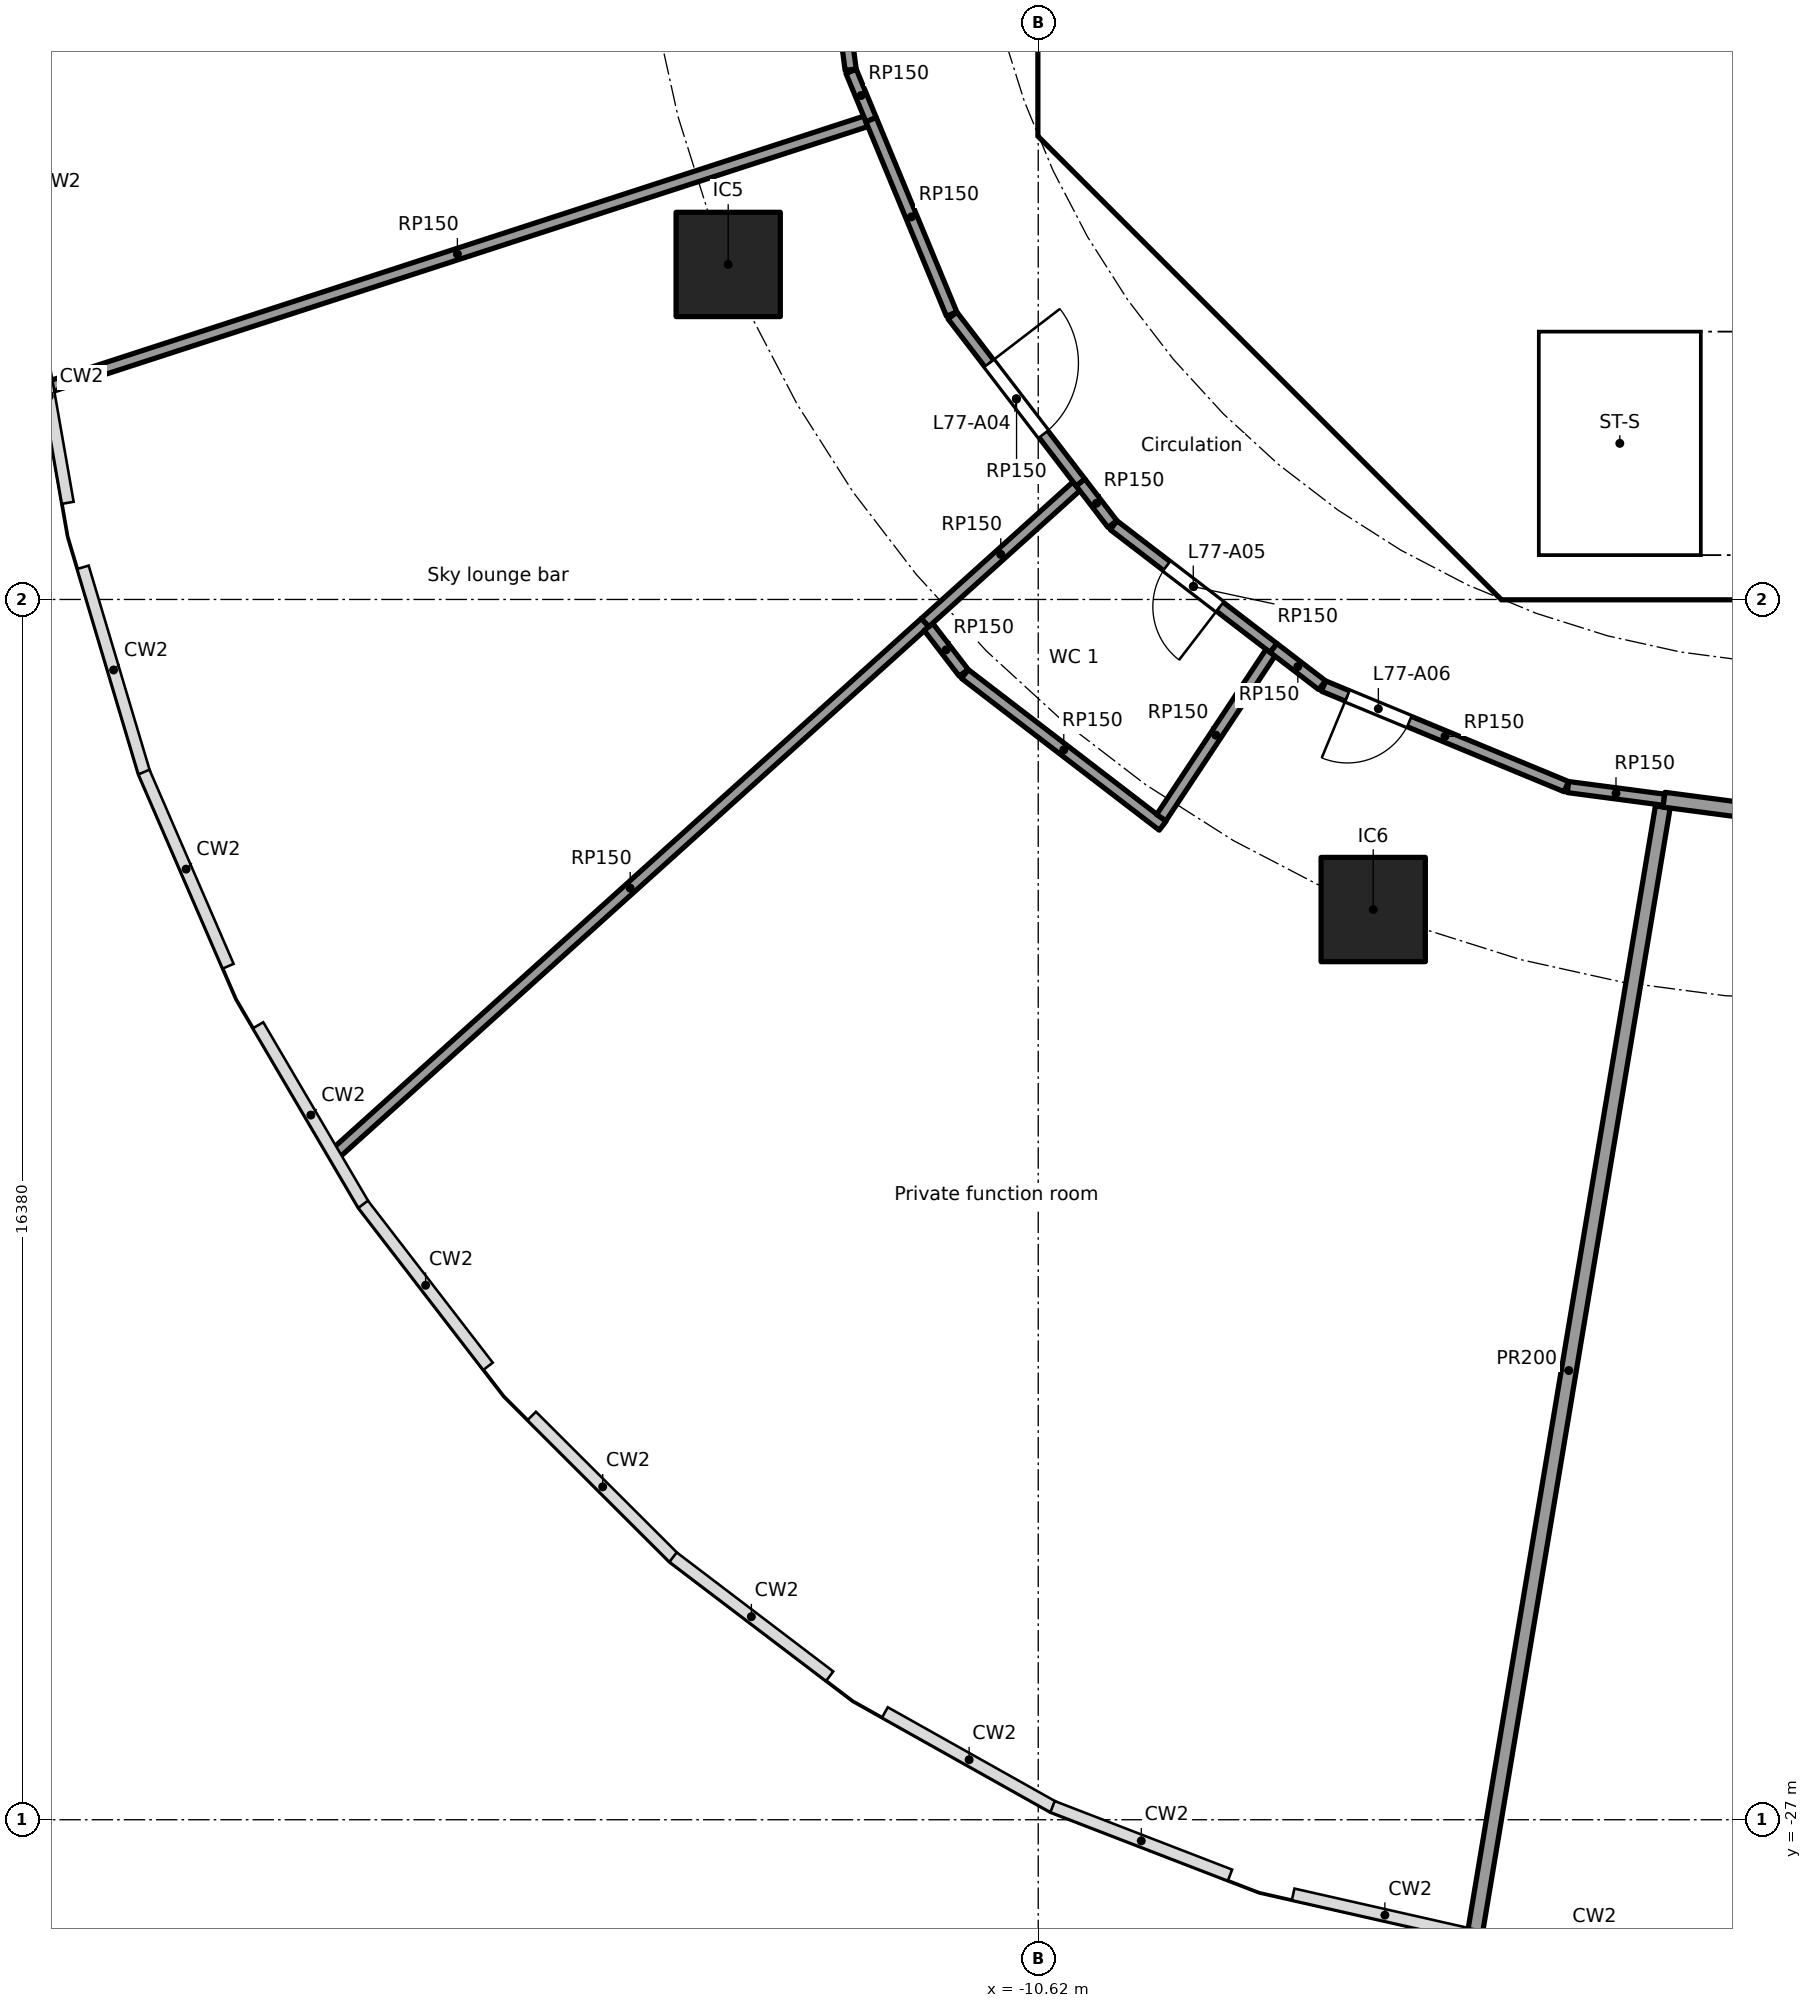
"""IFC4 building model, lengths in metres.
Left out: names, types, materials, properties, quantities, classifications, styles, units other than length and angle.
Written with IfcOpenShell. Run it as: python <this file> out.ifc"""

import sys

from ifc_helpers import new_model, si_unit, direction, frame, frame_2d, origin, origin_2d, place, context, subcontext, project, spatial, polyline, rectangle, outline, extrude, element, fill, save


model = new_model("IFC4")
c1 = context("Model", 3, precision=1e-05, world=origin(), true_north=direction((0.0, 1.0)))
c2 = subcontext(c1, "Body", "Model", "MODEL_VIEW")
j1 = project(units=[si_unit("LENGTHUNIT", "METRE"), si_unit("PLANEANGLEUNIT", "RADIAN")], contexts=[c1])
p1 = place(None, origin())
s1 = spatial("IfcSite", under=j1, at=p1, CompositionType="ELEMENT")
p2 = place(p1, origin())
s2 = spatial("IfcBuilding", under=s1, at=p2, CompositionType="ELEMENT")
p3 = place(p2, frame((0.0, 0.0, 310.3)))
s3 = spatial("IfcBuildingStorey", under=s2, at=p3, CompositionType="ELEMENT", Elevation=310.3)
for number, where, z_axis, x_axis in (
    (1, (-14.782, -6.123, 0.0), (0.0, 0.0, 1.0), (1.0, 0.0, 0.0)),
    (2, (-6.123, -14.782, 0.0), (0.0, 0.0, 1.0), (1.0, 0.0, 0.0)),
):
    element("IfcColumn", number, at=place(p3, frame(where, z_axis=z_axis, x_axis=x_axis)), inside=s3, PredefinedType="COLUMN", context=c2, shape_type="SweptSolid", body=[
        extrude(rectangle(XDim=1.4, YDim=1.4, at=origin_2d()), origin(), (0.0, 0.0, 1.0), 5.6),
    ])
p4 = place(p3, frame((-10.325, 3.801, 0.0), z_axis=(0.0, 0.0, 1.0), x_axis=(0.0, -1.0, 0.0)))
e3 = element("IfcWall", 3, at=p4, inside=s3, PredefinedType="SHEAR", context=c2, shape_type="SweptSolid", body=[
    extrude(rectangle(XDim=7.602, YDim=0.6, at=frame_2d((3.801, 0.0))), origin(), (0.0, 0.0, 1.0), 5.3),
])
p5 = place(p4, frame((0.651, 0.0, 0.0)))
e4 = element("IfcOpeningElement", 4, at=p5, cuts=e3, PredefinedType="OPENING", context=c2, shape_type="SweptSolid", body=[
    extrude(rectangle(XDim=1.5, YDim=2.1, at=frame_2d((0.75, 1.05))), frame((0.0, 0.31, 0.0), z_axis=(0.0, -1.0, 0.0), x_axis=(1.0, 0.0, 0.0)), (0.0, 0.0, 1.0), 0.62),
])
p6 = place(p4, frame((5.451, 0.0, 0.0)))
e5 = element("IfcOpeningElement", 5, at=p6, cuts=e3, PredefinedType="OPENING", context=c2, shape_type="SweptSolid", body=[
    extrude(rectangle(XDim=1.5, YDim=2.1, at=frame_2d((0.75, 1.05))), frame((0.0, 0.31, 0.0), z_axis=(0.0, -1.0, 0.0), x_axis=(1.0, 0.0, 0.0)), (0.0, 0.0, 1.0), 0.62),
])
p7 = place(p3, frame((-9.988, -4.613, 0.0), z_axis=(0.0, 0.0, 1.0), x_axis=(0.707106781187, -0.707106781187, 0.0)))
e6 = element("IfcWall", 6, at=p7, inside=s3, PredefinedType="SHEAR", context=c2, shape_type="SweptSolid", body=[
    extrude(rectangle(XDim=7.602, YDim=0.6, at=frame_2d((3.801, 0.0))), origin(), (0.0, 0.0, 1.0), 5.3),
])
p8 = place(p7, frame((6.151, 0.0, 0.0)))
e7 = element("IfcOpeningElement", 7, at=p8, cuts=e6, PredefinedType="OPENING", context=c2, shape_type="SweptSolid", body=[
    extrude(rectangle(XDim=1.1, YDim=2.1, at=frame_2d((0.55, 1.05))), frame((0.0, 0.31, 0.0), z_axis=(0.0, -1.0, 0.0), x_axis=(1.0, 0.0, 0.0)), (0.0, 0.0, 1.0), 0.62),
])
p9 = place(p3, frame((-7.0, -7.027, 0.0), z_axis=(0.0, 0.0, 1.0), x_axis=(0.0, 1.0, 0.0)))
e8 = element("IfcWall", 8, at=p9, inside=s3, PredefinedType="PARTITIONING", context=c2, shape_type="SweptSolid", body=[
    extrude(rectangle(XDim=2.927, YDim=0.15, at=frame_2d((1.463, 0.0))), origin(), (0.0, 0.0, 1.0), 5.3),
])
p10 = place(p9, frame((0.976, 0.0, 0.0)))
e9 = element("IfcOpeningElement", 9, at=p10, cuts=e8, PredefinedType="OPENING", context=c2, shape_type="SweptSolid", body=[
    extrude(rectangle(XDim=0.9, YDim=2.1, at=frame_2d((0.45, 1.05))), frame((0.0, 0.085, 0.0), z_axis=(0.0, -1.0, 0.0), x_axis=(1.0, 0.0, 0.0)), (0.0, 0.0, 1.0), 0.17),
])
p11 = place(p3, frame((-4.0, -6.5, 0.0), z_axis=(0.0, 0.0, 1.0), x_axis=(0.0, 1.0, 0.0)))
e10 = element("IfcWall", 10, at=p11, inside=s3, PredefinedType="SOLIDWALL", context=c2, shape_type="SweptSolid", body=[
    extrude(rectangle(XDim=2.2, YDim=0.2, at=frame_2d((1.1, 0.0))), origin(), (0.0, 0.0, 1.0), 5.3),
])
p12 = place(p11, frame((0.65, 0.0, 0.0)))
e11 = element("IfcOpeningElement", 11, at=p12, cuts=e10, PredefinedType="OPENING", context=c2, shape_type="SweptSolid", body=[
    extrude(rectangle(XDim=0.9, YDim=2.1, at=frame_2d((0.45, 1.05))), frame((0.0, 0.11, 0.0), z_axis=(0.0, -1.0, 0.0), x_axis=(1.0, 0.0, 0.0)), (0.0, 0.0, 1.0), 0.22),
])
p13 = place(p3, origin())
e12 = element("IfcWall", 12, at=p13, inside=s3, PredefinedType="SHEAR", context=c2, shape_type="SweptSolid", body=[
    extrude(outline(polyline([(-10.625, -3.801), (-10.025, -3.801), (-10.025, -4.152), (-9.776, -4.401), (-10.2, -4.825), (-10.625, -4.401), (-10.625, -3.801)])), origin(), (0.0, 0.0, 1.0), 5.3),
])
p14 = place(p3, origin())
e13 = element("IfcWall", 13, at=p14, inside=s3, PredefinedType="SHEAR", context=c2, shape_type="SweptSolid", body=[
    extrude(outline(polyline([(-4.152, -10.025), (4.152, -10.025), (4.401, -9.776), (4.825, -10.2), (4.401, -10.625), (-4.401, -10.625), (-4.825, -10.2), (-4.401, -9.776), (-4.152, -10.025)])), origin(), (0.0, 0.0, 1.0), 5.3),
])
p15 = place(p3, origin())
e14 = element("IfcWall", 14, at=p15, inside=s3, PredefinedType="SOLIDWALL", context=c2, shape_type="SweptSolid", body=[
    extrude(outline(polyline([(-6.7, -2.1), (-6.5, -2.1), (-6.5, -4.1), (-2.3, -4.1), (-2.3, -2.1), (-2.1, -2.1), (-2.1, -4.1), (2.1, -4.1), (2.1, -2.1), (2.3, -2.1), (2.3, -4.1), (4.3, -4.1), (4.3, -2.1), (4.5, -2.1), (4.5, -4.1), (6.5, -4.1), (6.5, -2.1), (6.7, -2.1), (6.7, -4.3), (-6.7, -4.3), (-6.7, -2.1)])), origin(), (0.0, 0.0, 1.0), 5.3),
])
p16 = place(p3, frame((-10.025, -4.0, 0.0), z_axis=(0.0, 0.0, 1.0), x_axis=(1.0, 0.0, 0.0)))
e15 = element("IfcWall", 15, at=p16, inside=s3, PredefinedType="PARTITIONING", context=c2, shape_type="SweptSolid", body=[
    extrude(rectangle(XDim=3.325, YDim=0.2, at=frame_2d((1.662, 0.0))), origin(), (0.0, 0.0, 1.0), 5.3),
])
p17 = place(p3, origin())
e16 = element("IfcWall", 16, at=p17, inside=s3, PredefinedType="SOLIDWALL", context=c2, shape_type="SweptSolid", body=[
    extrude(outline(polyline([(-3.9, -10.025), (-4.1, -10.025), (-4.1, -7.025), (-3.9, -7.025), (-3.9, -10.025)])), origin(), (0.0, 0.0, 1.0), 5.3),
])
p18 = place(p3, origin())
e17 = element("IfcWall", 17, at=p18, inside=s3, PredefinedType="SOLIDWALL", context=c2, shape_type="SweptSolid", body=[
    extrude(outline(polyline([(4.1, -7.025), (-4.1, -7.025), (-4.1, -6.5), (4.1, -6.5), (4.1, -7.025)])), origin(), (0.0, 0.0, 1.0), 5.3),
])
p19 = place(p3, frame((-13.138, -3.508, 0.0), z_axis=(0.0, 0.0, 1.0), x_axis=(-0.130499283623, 0.991448403586, 0.0)))
e18 = element("IfcWall", 18, at=p19, inside=s3, PredefinedType="PARTITIONING", context=c2, shape_type="SweptSolid", body=[
    extrude(rectangle(XDim=3.527, YDim=0.15, at=frame_2d((1.763, 0.0))), origin(), (0.0, 0.0, 1.0), 5.3),
])
p20 = place(p3, frame((-12.935, -4.203, 0.0), z_axis=(0.0, 0.0, 1.0), x_axis=(-0.951055230502, -0.30902095161, 0.0)))
e19 = element("IfcWall", 19, at=p20, inside=s3, PredefinedType="PARTITIONING", context=c2, shape_type="SweptSolid", body=[
    extrude(rectangle(XDim=11.529, YDim=0.15, at=frame_2d((5.765, 0.0))), origin(), (0.0, 0.0, 1.0), 5.3),
])
p21 = place(p3, frame((-12.863, -4.18, 0.0), z_axis=(0.0, 0.0, 1.0), x_axis=(-0.382689470177, 0.923877031545, 0.0)))
e20 = element("IfcWall", 20, at=p21, inside=s3, PredefinedType="PARTITIONING", context=c2, shape_type="SweptSolid", body=[
    extrude(rectangle(XDim=0.702, YDim=0.15, at=frame_2d((0.351, 0.0))), origin(), (0.0, 0.0, 1.0), 5.3),
])
p22 = place(p3, frame((-12.138, -10.93, 0.0), z_axis=(0.0, 0.0, 1.0), x_axis=(-0.743151720373, -0.669122948722, 0.0)))
e21 = element("IfcWall", 21, at=p22, inside=s3, PredefinedType="PARTITIONING", context=c2, shape_type="SweptSolid", body=[
    extrude(rectangle(XDim=10.656, YDim=0.15, at=frame_2d((5.328, 0.0))), origin(), (0.0, 0.0, 1.0), 5.3),
])
p23 = place(p3, frame((-11.782, -6.789, 0.0), z_axis=(0.0, 0.0, 1.0), x_axis=(-0.382674980262, 0.923883033442, 0.0)))
e22 = element("IfcWall", 22, at=p23, inside=s3, PredefinedType="PARTITIONING", context=c2, shape_type="SweptSolid", body=[
    extrude(rectangle(XDim=2.824, YDim=0.15, at=frame_2d((1.412, 0.0))), origin(), (0.0, 0.0, 1.0), 5.3),
])
p24 = place(p3, frame((-11.621, -11.604, 0.0), z_axis=(0.0, 0.0, 1.0), x_axis=(-0.608781909099, 0.793337624945, 0.0)))
e23 = element("IfcWall", 23, at=p24, inside=s3, PredefinedType="PARTITIONING", context=c2, shape_type="SweptSolid", body=[
    extrude(rectangle(XDim=0.775, YDim=0.15, at=frame_2d((0.388, 0.0))), origin(), (0.0, 0.0, 1.0), 5.3),
])
p25 = place(p3, frame((-10.107, -9.101, 0.0), z_axis=(0.0, 0.0, 1.0), x_axis=(-0.743116473198, -0.669162093414, 0.0)))
e24 = element("IfcWall", 24, at=p25, inside=s3, PredefinedType="PARTITIONING", context=c2, shape_type="SweptSolid", body=[
    extrude(rectangle(XDim=2.733, YDim=0.15, at=frame_2d((1.367, 0.0))), origin(), (0.0, 0.0, 1.0), 5.3),
])
p26 = place(p3, frame((-10.051, -9.05, 0.0), z_axis=(0.0, 0.0, 1.0), x_axis=(-0.608745411834, 0.793365630445, 0.0)))
e25 = element("IfcWall", 25, at=p26, inside=s3, PredefinedType="PARTITIONING", context=c2, shape_type="SweptSolid", body=[
    extrude(rectangle(XDim=2.825, YDim=0.15, at=frame_2d((1.412, 0.0))), origin(), (0.0, 0.0, 1.0), 5.3),
])
p27 = place(p26, frame((0.818, 0.0, 0.0)))
e26 = element("IfcOpeningElement", 26, at=p27, cuts=e25, PredefinedType="OPENING", context=c2, shape_type="SweptSolid", body=[
    extrude(rectangle(XDim=1.2, YDim=2.1, at=frame_2d((0.6, 1.05))), frame((0.0, 0.085, 0.0), z_axis=(0.0, -1.0, 0.0), x_axis=(1.0, 0.0, 0.0)), (0.0, 0.0, 1.0), 0.17),
])
p28 = place(p3, frame((-9.624, -9.607, 0.0), z_axis=(0.0, 0.0, 1.0), x_axis=(-0.608701690893, 0.793399175387, 0.0)))
e27 = element("IfcWall", 27, at=p28, inside=s3, PredefinedType="PARTITIONING", context=c2, shape_type="SweptSolid", body=[
    extrude(rectangle(XDim=0.702, YDim=0.15, at=frame_2d((0.351, 0.0))), origin(), (0.0, 0.0, 1.0), 5.3),
])
p29 = place(p3, frame((-8.95, -13.657, 0.0), z_axis=(0.0, 0.0, 1.0), x_axis=(-0.793366697833, 0.608744020725, 0.0)))
e28 = element("IfcWall", 28, at=p29, inside=s3, PredefinedType="PARTITIONING", context=c2, shape_type="SweptSolid", body=[
    extrude(rectangle(XDim=3.346, YDim=0.15, at=frame_2d((1.673, 0.0))), origin(), (0.0, 0.0, 1.0), 5.3),
])
p30 = place(p3, frame((-7.46, -11.271, 0.0), z_axis=(0.0, 0.0, 1.0), x_axis=(-0.793357968255, 0.608755397682, 0.0)))
e29 = element("IfcWall", 29, at=p30, inside=s3, PredefinedType="PARTITIONING", context=c2, shape_type="SweptSolid", body=[
    extrude(rectangle(XDim=2.706, YDim=0.15, at=frame_2d((1.353, 0.0))), origin(), (0.0, 0.0, 1.0), 5.3),
])
p31 = place(p30, frame((0.909, 0.0, 0.0)))
e30 = element("IfcOpeningElement", 30, at=p31, cuts=e29, PredefinedType="OPENING", context=c2, shape_type="SweptSolid", body=[
    extrude(rectangle(XDim=0.9, YDim=2.1, at=frame_2d((0.45, 1.05))), frame((0.0, 0.085, 0.0), z_axis=(0.0, -1.0, 0.0), x_axis=(1.0, 0.0, 0.0)), (0.0, 0.0, 1.0), 0.17),
])
p32 = place(p3, frame((-7.502, -11.334, 0.0), z_axis=(0.0, 0.0, 1.0), x_axis=(-0.55191859821, -0.833897991933, 0.0)))
e31 = element("IfcWall", 31, at=p32, inside=s3, PredefinedType="PARTITIONING", context=c2, shape_type="SweptSolid", body=[
    extrude(rectangle(XDim=2.656, YDim=0.15, at=frame_2d((1.328, 0.0))), origin(), (0.0, 0.0, 1.0), 5.3),
])
p33 = place(p3, frame((-6.809, -11.771, 0.0), z_axis=(0.0, 0.0, 1.0), x_axis=(-0.793419582726, 0.60867509046, 0.0)))
e32 = element("IfcWall", 32, at=p33, inside=s3, PredefinedType="PARTITIONING", context=c2, shape_type="SweptSolid", body=[
    extrude(rectangle(XDim=0.821, YDim=0.15, at=frame_2d((0.41, 0.0))), origin(), (0.0, 0.0, 1.0), 5.3),
])
p34 = place(p3, frame((-3.531, -13.132, 0.0), z_axis=(0.0, 0.0, 1.0), x_axis=(-0.923881838111, 0.382677866108, 0.0)))
e33 = element("IfcWall", 33, at=p34, inside=s3, PredefinedType="PARTITIONING", context=c2, shape_type="SweptSolid", body=[
    extrude(rectangle(XDim=3.527, YDim=0.15, at=frame_2d((1.763, 0.0))), origin(), (0.0, 0.0, 1.0), 5.3),
])
p35 = place(p34, frame((2.281, 0.0, 0.0)))
e34 = element("IfcOpeningElement", 34, at=p35, cuts=e33, PredefinedType="OPENING", context=c2, shape_type="SweptSolid", body=[
    extrude(rectangle(XDim=0.9, YDim=2.1, at=frame_2d((0.45, 1.05))), frame((0.0, 0.085, 0.0), z_axis=(0.0, -1.0, 0.0), x_axis=(1.0, 0.0, 0.0)), (0.0, 0.0, 1.0), 0.17),
])
p36 = place(p3, frame((-2.219, -13.308, 0.0), z_axis=(0.0, 0.0, 1.0), x_axis=(-0.991441503566, 0.130551694767, 0.0)))
e35 = element("IfcWall", 35, at=p36, inside=s3, PredefinedType="PARTITIONING", context=c2, shape_type="SweptSolid", body=[
    extrude(rectangle(XDim=1.3, YDim=0.15, at=frame_2d((0.65, 0.0))), origin(), (0.0, 0.0, 1.0), 5.3),
])
p37 = place(p3, frame((-2.236, -13.406, 0.0), z_axis=(0.0, 0.0, 1.0), x_axis=(-0.164512574318, -0.986374985942, 0.0)))
e36 = element("IfcWall", 36, at=p37, inside=s3, PredefinedType="PARTITIONING", context=c2, shape_type="SweptSolid", body=[
    extrude(rectangle(XDim=15.336, YDim=0.2, at=frame_2d((7.668, 0.0))), origin(), (0.0, 0.0, 1.0), 5.3),
])
p38 = place(p3, frame((-0.015, -13.598, 0.0), z_axis=(0.0, 0.0, 1.0), x_axis=(-0.991454669289, 0.130451672069, 0.0)))
e37 = element("IfcWall", 37, at=p38, inside=s3, PredefinedType="PARTITIONING", context=c2, shape_type="SweptSolid", body=[
    extrude(rectangle(XDim=2.223, YDim=0.2, at=frame_2d((1.112, 0.0))), origin(), (0.0, 0.0, 1.0), 5.3),
])
p39 = place(p10, origin())
e38 = element("IfcDoor", 38, at=p39, inside=s3, OperationType="SINGLE_SWING_RIGHT", PredefinedType="DOOR", context=c2, shape_type="SweptSolid", body=[
    extrude(rectangle(XDim=0.9, YDim=2.1, at=frame_2d((0.45, 1.05))), frame((0.0, 0.025, 0.0), z_axis=(0.0, -1.0, 0.0), x_axis=(1.0, 0.0, 0.0)), (0.0, 0.0, 1.0), 0.05),
])
fill(e9, e38)
p40 = place(p12, frame((0.9, 0.0, 0.0), x_axis=(-1.0, 0.0, 0.0)))
e39 = element("IfcDoor", 39, at=p40, inside=s3, OperationType="SINGLE_SWING_LEFT", PredefinedType="DOOR", context=c2, shape_type="SweptSolid", body=[
    extrude(rectangle(XDim=0.9, YDim=2.1, at=frame_2d((0.45, 1.05))), frame((0.0, 0.025, 0.0), z_axis=(0.0, -1.0, 0.0), x_axis=(1.0, 0.0, 0.0)), (0.0, 0.0, 1.0), 0.05),
])
fill(e11, e39)
p41 = place(p8, origin())
e40 = element("IfcDoor", 40, at=p41, inside=s3, OperationType="SINGLE_SWING_LEFT", PredefinedType="DOOR", context=c2, shape_type="SweptSolid", body=[
    extrude(rectangle(XDim=1.1, YDim=2.1, at=frame_2d((0.55, 1.05))), frame((0.0, 0.025, 0.0), z_axis=(0.0, -1.0, 0.0), x_axis=(1.0, 0.0, 0.0)), (0.0, 0.0, 1.0), 0.05),
])
fill(e7, e40)
p42 = place(p27, frame((1.2, 0.0, 0.0), x_axis=(-1.0, 0.0, 0.0)))
e41 = element("IfcDoor", 41, at=p42, inside=s3, OperationType="SINGLE_SWING_LEFT", PredefinedType="DOOR", context=c2, shape_type="SweptSolid", body=[
    extrude(rectangle(XDim=1.2, YDim=2.1, at=frame_2d((0.6, 1.05))), frame((0.0, 0.025, 0.0), z_axis=(0.0, -1.0, 0.0), x_axis=(1.0, 0.0, 0.0)), (0.0, 0.0, 1.0), 0.05),
])
fill(e26, e41)
p43 = place(p31, origin())
e42 = element("IfcDoor", 42, at=p43, inside=s3, OperationType="SINGLE_SWING_LEFT", PredefinedType="DOOR", context=c2, shape_type="SweptSolid", body=[
    extrude(rectangle(XDim=0.9, YDim=2.1, at=frame_2d((0.45, 1.05))), frame((0.0, 0.025, 0.0), z_axis=(0.0, -1.0, 0.0), x_axis=(1.0, 0.0, 0.0)), (0.0, 0.0, 1.0), 0.05),
])
fill(e30, e42)
p44 = place(p35, origin())
e43 = element("IfcDoor", 43, at=p44, inside=s3, OperationType="SINGLE_SWING_RIGHT", PredefinedType="DOOR", context=c2, shape_type="SweptSolid", body=[
    extrude(rectangle(XDim=0.9, YDim=2.1, at=frame_2d((0.45, 1.05))), frame((0.0, 0.025, 0.0), z_axis=(0.0, -1.0, 0.0), x_axis=(1.0, 0.0, 0.0)), (0.0, 0.0, 1.0), 0.05),
])
fill(e34, e43)
save(model, sys.argv[1])
